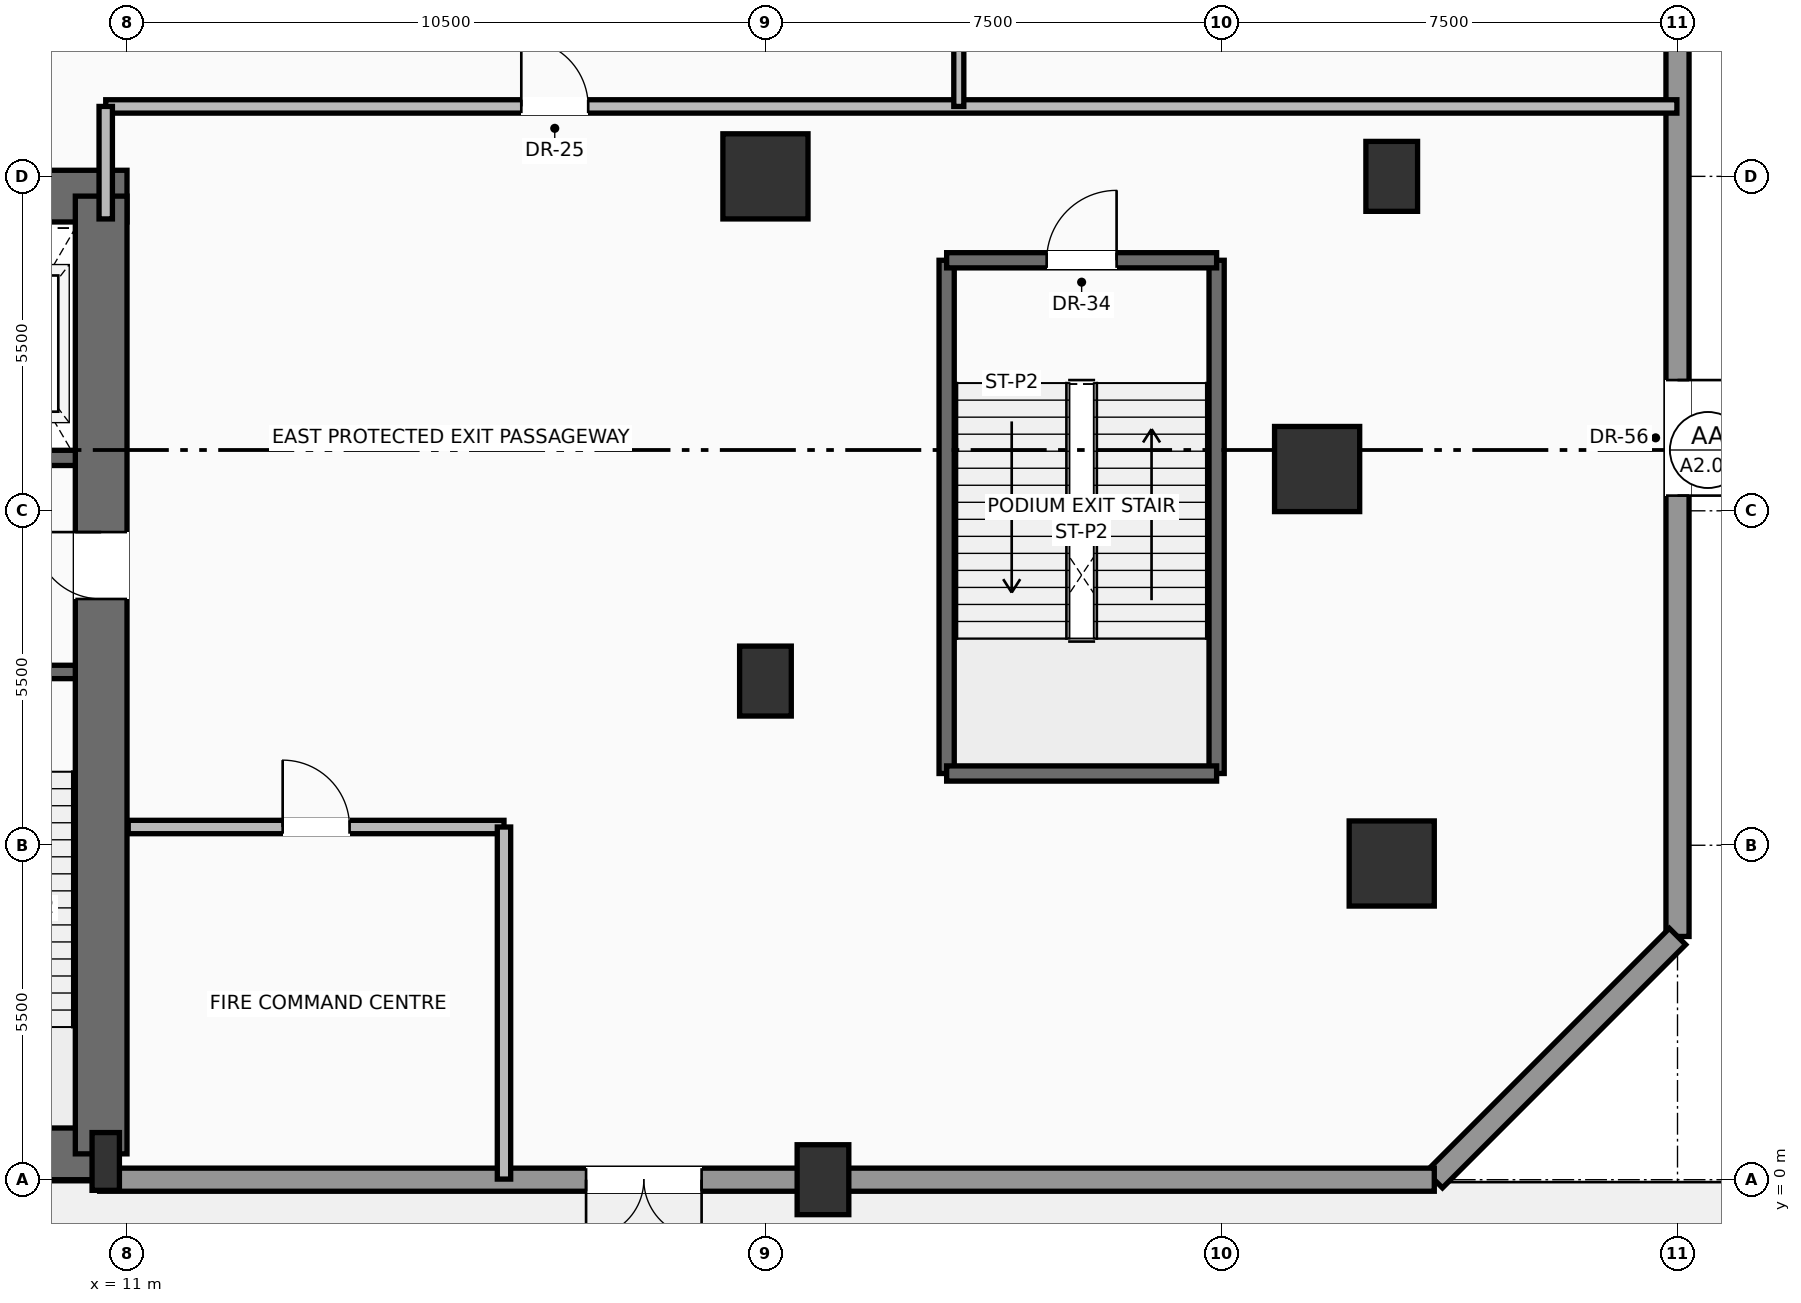
"""IFC4 building model, lengths in metres.
Left out: names, types, materials, properties, quantities, classifications, styles, units other than length and angle.
Written with IfcOpenShell. Run it as: python <this file> out.ifc"""

import sys

from ifc_helpers import new_model, si_unit, direction, frame, frame_2d, origin, origin_2d, place, context, subcontext, project, spatial, rectangle, hollow_rectangle, extrude, source, transform, mapped, element, fill, save


model = new_model("IFC4")
c1 = context("Model", 3, precision=1e-05, world=origin(), true_north=direction((0.0, 1.0)))
c2 = subcontext(c1, "Body", "Model", "MODEL_VIEW")
j1 = project(units=[si_unit("LENGTHUNIT", "METRE"), si_unit("PLANEANGLEUNIT", "RADIAN")], contexts=[c1])
p1 = place(None, origin())
s1 = spatial("IfcSite", under=j1, at=p1, CompositionType="ELEMENT")
p2 = place(p1, origin())
s2 = spatial("IfcBuilding", under=s1, at=p2, CompositionType="ELEMENT")
p3 = place(p2, origin())
s3 = spatial("IfcBuildingStorey", under=s2, at=p3, CompositionType="ELEMENT", Elevation=0.0)
p4 = place(p3, frame((-10.65, 0.425, 0.0), z_axis=(0.0, 0.0, 1.0), x_axis=(1.0, 0.0, 0.0)))
e1 = element("IfcWall", 1, at=p4, inside=s3, PredefinedType="SHEAR", context=c2, shape_type="SweptSolid", body=[
    extrude(rectangle(XDim=21.3, YDim=0.85, at=frame_2d((10.65, 0.0))), origin(), (0.0, 0.0, 1.0), 5.15),
])
p5 = place(p3, frame((-11.0, 16.175, 0.0), z_axis=(0.0, 0.0, 1.0), x_axis=(1.0, 0.0, 0.0)))
e2 = element("IfcWall", 2, at=p5, inside=s3, PredefinedType="SHEAR", context=c2, shape_type="SweptSolid", body=[
    extrude(rectangle(XDim=22.0, YDim=0.85, at=frame_2d((11.0, 0.0))), origin(), (0.0, 0.0, 1.0), 5.15),
])
p6 = place(p5, frame((3.57, 0.0, 0.0)))
e3 = element("IfcOpeningElement", 3, at=p6, cuts=e2, PredefinedType="OPENING", context=c2, shape_type="SweptSolid", body=[
    extrude(rectangle(XDim=1.3, YDim=2.3, at=frame_2d((0.65, 1.15))), frame((0.0, 0.435, 0.0), z_axis=(0.0, -1.0, 0.0), x_axis=(1.0, 0.0, 0.0)), (0.0, 0.0, 1.0), 0.87),
])
p7 = place(p5, frame((10.0, 0.0, 0.0)))
e4 = element("IfcOpeningElement", 4, at=p7, cuts=e2, PredefinedType="OPENING", context=c2, shape_type="SweptSolid", body=[
    extrude(rectangle(XDim=2.0, YDim=2.4, at=frame_2d((1.0, 1.2))), frame((0.0, 0.435, 0.0), z_axis=(0.0, -1.0, 0.0), x_axis=(1.0, 0.0, 0.0)), (0.0, 0.0, 1.0), 0.87),
])
p8 = place(p3, frame((10.575, 0.425, 0.0), z_axis=(0.0, 0.0, 1.0), x_axis=(0.0, 1.0, 0.0)))
e5 = element("IfcWall", 5, at=p8, inside=s3, PredefinedType="SHEAR", context=c2, shape_type="SweptSolid", body=[
    extrude(rectangle(XDim=15.75, YDim=0.85, at=frame_2d((7.875, 0.0))), origin(), (0.0, 0.0, 1.0), 5.15),
])
p9 = place(p8, frame((9.125, 0.0, 0.0)))
e6 = element("IfcOpeningElement", 6, at=p9, cuts=e5, PredefinedType="OPENING", context=c2, shape_type="SweptSolid", body=[
    extrude(rectangle(XDim=1.1, YDim=2.2, at=frame_2d((0.55, 1.1))), frame((0.0, 0.435, 0.0), z_axis=(0.0, -1.0, 0.0), x_axis=(1.0, 0.0, 0.0)), (0.0, 0.0, 1.0), 0.87),
])
m1 = source(origin(), c2, "Body", "SweptSolid", [
    extrude(rectangle(XDim=0.45, YDim=0.95, at=origin_2d()), origin(), (0.0, 0.0, 1.0), 5.5),
])
p10 = place(p3, frame((10.65, 0.3, 0.0), z_axis=(0.0, 0.0, 1.0), x_axis=(1.0, 0.0, 0.0)))
e7 = element("IfcColumn", 7, at=p10, inside=s3, PredefinedType="PILASTER", context=c2, shape_type="MappedRepresentation", body=[
    mapped(m1, transform((0.0, 0.0, 0.0), scale=1.0)),
])
m2 = source(origin(), c2, "Body", "SweptSolid", [
    extrude(rectangle(XDim=0.85, YDim=1.15, at=origin_2d()), origin(), (0.0, 0.0, 1.0), 5.5),
])
for number, where, z_axis, x_axis in (
    (8, (22.446, 0.0, 0.0), (0.0, 0.0, 1.0), (1.0, 0.0, 0.0)),
    (9, (21.5, 8.2, 0.0), (0.0, 0.0, 1.0), (1.0, 0.0, 0.0)),
    (10, (31.8, 16.5, 0.0), (0.0, 0.0, 1.0), (1.0, 0.0, 0.0)),
):
    element("IfcColumn", number, at=place(p3, frame(where, z_axis=z_axis, x_axis=x_axis)), inside=s3, PredefinedType="COLUMN", context=c2, shape_type="MappedRepresentation", body=[
        mapped(m2, transform((0.0, 0.0, 0.0), scale=1.0)),
    ])
m3 = source(origin(), c2, "Body", "SweptSolid", [
    extrude(hollow_rectangle(XDim=1.4, YDim=1.4, WallThickness=0.07, at=origin_2d()), origin(), (0.0, 0.0, 1.0), 5.5),
])
for number, where, z_axis, x_axis in (
    (11, (21.5, 16.5, 0.0), (0.0, 0.0, 1.0), (1.0, 0.0, 0.0)),
    (12, (31.8, 5.2, 0.0), (0.0, 0.0, 1.0), (1.0, 0.0, 0.0)),
    (13, (30.573, 11.687, 0.0), (0.0, 0.0, 1.0), (1.0, 0.0, 0.0)),
):
    element("IfcColumn", number, at=place(p3, frame(where, z_axis=z_axis, x_axis=x_axis)), inside=s3, PredefinedType="COLUMN", context=c2, shape_type="MappedRepresentation", body=[
        mapped(m3, transform((0.0, 0.0, 0.0), scale=1.0)),
    ])
p11 = place(p3, frame((36.5, 46.0, 0.0), z_axis=(0.0, 0.0, 1.0), x_axis=(0.0, -1.0, 0.0)))
e14 = element("IfcWall", 14, at=p11, inside=s3, PredefinedType="SOLIDWALL", context=c2, shape_type="SweptSolid", body=[
    extrude(rectangle(XDim=42.0, YDim=0.38, at=frame_2d((21.0, 0.0))), origin(), (0.0, 0.0, 1.0), 4.09),
])
p12 = place(p11, frame((32.85, 0.0, 0.0)))
e15 = element("IfcOpeningElement", 15, at=p12, cuts=e14, PredefinedType="OPENING", context=c2, shape_type="SweptSolid", body=[
    extrude(rectangle(XDim=1.9, YDim=2.3, at=frame_2d((0.95, 1.15))), frame((0.0, 0.2, 0.0), z_axis=(0.0, -1.0, 0.0), x_axis=(1.0, 0.0, 0.0)), (0.0, 0.0, 1.0), 0.4),
])
p13 = place(p11, frame((11.55, 0.0, 0.0)))
e16 = element("IfcOpeningElement", 16, at=p13, cuts=e14, PredefinedType="OPENING", context=c2, shape_type="SweptSolid", body=[
    extrude(rectangle(XDim=1.9, YDim=2.3, at=frame_2d((0.95, 1.15))), frame((0.0, 0.2, 0.0), z_axis=(0.0, -1.0, 0.0), x_axis=(1.0, 0.0, 0.0)), (0.0, 0.0, 1.0), 0.4),
])
p14 = place(p3, frame((36.5, 4.0, 0.0), z_axis=(0.0, 0.0, 1.0), x_axis=(-0.707106781187, -0.707106781187, 0.0)))
e17 = element("IfcWall", 17, at=p14, inside=s3, PredefinedType="SOLIDWALL", context=c2, shape_type="SweptSolid", body=[
    extrude(rectangle(XDim=5.657, YDim=0.38, at=frame_2d((2.828, 0.0))), origin(), (0.0, 0.0, 1.0), 4.09),
])
p15 = place(p3, frame((32.5, 0.0, 0.0), z_axis=(0.0, 0.0, 1.0), x_axis=(-1.0, 0.0, 0.0)))
e18 = element("IfcWall", 18, at=p15, inside=s3, PredefinedType="SOLIDWALL", context=c2, shape_type="SweptSolid", body=[
    extrude(rectangle(XDim=21.95, YDim=0.38, at=frame_2d((10.975, 0.0))), origin(), (0.0, 0.0, 1.0), 4.09),
])
p16 = place(p15, frame((12.05, 0.0, 0.0)))
e19 = element("IfcOpeningElement", 19, at=p16, cuts=e18, PredefinedType="OPENING", context=c2, shape_type="SweptSolid", body=[
    extrude(rectangle(XDim=1.9, YDim=2.3, at=frame_2d((0.95, 1.15))), frame((0.0, 0.2, 0.0), z_axis=(0.0, -1.0, 0.0), x_axis=(1.0, 0.0, 0.0)), (0.0, 0.0, 1.0), 0.4),
])
p17 = place(p3, frame((5.5, 8.35, 0.0), z_axis=(0.0, 0.0, 1.0), x_axis=(1.0, 0.0, 0.0)))
e20 = element("IfcWall", 20, at=p17, inside=s3, PredefinedType="SOLIDWALL", context=c2, shape_type="SweptSolid", body=[
    extrude(rectangle(XDim=4.65, YDim=0.22, at=frame_2d((2.325, 0.0))), origin(), (0.0, 0.0, 1.0), 5.15),
])
p18 = place(p17, frame((2.5, 0.0, 0.0)))
e21 = element("IfcOpeningElement", 21, at=p18, cuts=e20, PredefinedType="OPENING", context=c2, shape_type="SweptSolid", body=[
    extrude(rectangle(XDim=1.15, YDim=2.2, at=frame_2d((0.575, 1.1))), frame((0.0, 0.12, 0.0), z_axis=(0.0, -1.0, 0.0), x_axis=(1.0, 0.0, 0.0)), (0.0, 0.0, 1.0), 0.24),
])
p19 = place(p3, frame((10.15, 11.87, 0.0), z_axis=(0.0, 0.0, 1.0), x_axis=(-1.0, 0.0, 0.0)))
e22 = element("IfcWall", 22, at=p19, inside=s3, PredefinedType="SOLIDWALL", context=c2, shape_type="SweptSolid", body=[
    extrude(rectangle(XDim=4.65, YDim=0.25, at=frame_2d((2.325, 0.0))), origin(), (0.0, 0.0, 1.0), 5.15),
])
p20 = place(p19, frame((0.5, 0.0, 0.0)))
e23 = element("IfcOpeningElement", 23, at=p20, cuts=e22, PredefinedType="OPENING", context=c2, shape_type="SweptSolid", body=[
    extrude(rectangle(XDim=1.2, YDim=2.25, at=frame_2d((0.6, 1.125))), frame((0.0, 0.135, 0.0), z_axis=(0.0, -1.0, 0.0), x_axis=(1.0, 0.0, 0.0)), (0.0, 0.0, 1.0), 0.27),
])
for number, where, z_axis, x_axis in (
    (24, (24.48, 6.68, 0.0), (0.0, 0.0, 1.0), (0.0, 1.0, 0.0)),
    (25, (28.92, 6.68, 0.0), (0.0, 0.0, 1.0), (0.0, 1.0, 0.0)),
):
    element("IfcWall", number, at=place(p3, frame(where, z_axis=z_axis, x_axis=x_axis)), inside=s3, PredefinedType="SOLIDWALL", context=c2, shape_type="SweptSolid", body=[
        extrude(rectangle(XDim=8.44, YDim=0.25, at=frame_2d((4.22, 0.0))), origin(), (0.0, 0.0, 1.0), 5.15),
    ])
p21 = place(p3, frame((28.92, 6.68, 0.0), z_axis=(0.0, 0.0, 1.0), x_axis=(-1.0, 0.0, 0.0)))
e26 = element("IfcWall", 26, at=p21, inside=s3, PredefinedType="SOLIDWALL", context=c2, shape_type="SweptSolid", body=[
    extrude(rectangle(XDim=4.44, YDim=0.25, at=frame_2d((2.22, 0.0))), origin(), (0.0, 0.0, 1.0), 5.15),
])
p22 = place(p3, frame((24.48, 15.12, 0.0), z_axis=(0.0, 0.0, 1.0), x_axis=(1.0, 0.0, 0.0)))
e27 = element("IfcWall", 27, at=p22, inside=s3, PredefinedType="SOLIDWALL", context=c2, shape_type="SweptSolid", body=[
    extrude(rectangle(XDim=4.44, YDim=0.25, at=frame_2d((2.22, 0.0))), origin(), (0.0, 0.0, 1.0), 5.15),
])
p23 = place(p22, frame((1.645, 0.0, 0.0)))
e28 = element("IfcOpeningElement", 28, at=p23, cuts=e27, PredefinedType="OPENING", context=c2, shape_type="SweptSolid", body=[
    extrude(rectangle(XDim=1.15, YDim=2.2, at=frame_2d((0.575, 1.1))), frame((0.0, 0.135, 0.0), z_axis=(0.0, -1.0, 0.0), x_axis=(1.0, 0.0, 0.0)), (0.0, 0.0, 1.0), 0.27),
])
p24 = place(p3, frame((11.02, 5.8, 0.0), z_axis=(0.0, 0.0, 1.0), x_axis=(1.0, 0.0, 0.0)))
e29 = element("IfcWall", 29, at=p24, inside=s3, PredefinedType="SOLIDWALL", context=c2, shape_type="SweptSolid", body=[
    extrude(rectangle(XDim=6.18, YDim=0.22, at=frame_2d((3.09, 0.0))), origin(), (0.0, 0.0, 1.0), 5.142),
])
p25 = place(p24, frame((2.54, 0.0, 0.0)))
e30 = element("IfcOpeningElement", 30, at=p25, cuts=e29, PredefinedType="OPENING", context=c2, shape_type="SweptSolid", body=[
    extrude(rectangle(XDim=1.1, YDim=2.2, at=frame_2d((0.55, 1.1))), frame((0.0, 0.12, 0.0), z_axis=(0.0, -1.0, 0.0), x_axis=(1.0, 0.0, 0.0)), (0.0, 0.0, 1.0), 0.24),
])
p26 = place(p3, frame((17.2, 0.01, 0.0), z_axis=(0.0, 0.0, 1.0), x_axis=(0.0, 1.0, 0.0)))
e31 = element("IfcWall", 31, at=p26, inside=s3, PredefinedType="SOLIDWALL", context=c2, shape_type="SweptSolid", body=[
    extrude(rectangle(XDim=5.79, YDim=0.22, at=frame_2d((2.895, 0.0))), origin(), (0.0, 0.0, 1.0), 4.102),
])
p27 = place(p3, frame((10.65, 17.65, 0.0), z_axis=(0.0, 0.0, 1.0), x_axis=(1.0, 0.0, 0.0)))
e32 = element("IfcWall", 32, at=p27, inside=s3, PredefinedType="SOLIDWALL", context=c2, shape_type="SweptSolid", body=[
    extrude(rectangle(XDim=25.84, YDim=0.22, at=frame_2d((12.92, 0.0))), origin(), (0.0, 0.0, 1.0), 4.102),
])
p28 = place(p27, frame((6.835, 0.0, 0.0)))
e33 = element("IfcOpeningElement", 33, at=p28, cuts=e32, PredefinedType="OPENING", context=c2, shape_type="SweptSolid", body=[
    extrude(rectangle(XDim=1.1, YDim=2.2, at=frame_2d((0.55, 1.1))), frame((0.0, 0.12, 0.0), z_axis=(0.0, -1.0, 0.0), x_axis=(1.0, 0.0, 0.0)), (0.0, 0.0, 1.0), 0.24),
])
p29 = place(p3, frame((10.65, 15.8, 0.0), z_axis=(0.0, 0.0, 1.0), x_axis=(0.0, 1.0, 0.0)))
e34 = element("IfcWall", 34, at=p29, inside=s3, PredefinedType="SOLIDWALL", context=c2, shape_type="SweptSolid", body=[
    extrude(rectangle(XDim=1.85, YDim=0.22, at=frame_2d((0.925, 0.0))), origin(), (0.0, 0.0, 1.0), 4.102),
])
p30 = place(p3, frame((24.68, 17.65, 0.0), z_axis=(0.0, 0.0, 1.0), x_axis=(0.0, 1.0, 0.0)))
e35 = element("IfcWall", 35, at=p30, inside=s3, PredefinedType="PARTITIONING", context=c2, shape_type="SweptSolid", body=[
    extrude(rectangle(XDim=11.63, YDim=0.165, at=frame_2d((5.815, 0.0))), origin(), (0.0, 0.0, 1.0), 4.215),
])
p31 = place(p30, frame((4.815, 0.0, 0.0)))
e36 = element("IfcOpeningElement", 36, at=p31, cuts=e35, PredefinedType="OPENING", context=c2, shape_type="SweptSolid", body=[
    extrude(rectangle(XDim=2.0, YDim=2.4, at=frame_2d((1.0, 1.2))), frame((0.0, 0.093, 0.0), z_axis=(0.0, -1.0, 0.0), x_axis=(1.0, 0.0, 0.0)), (0.0, 0.0, 1.0), 0.185),
])
m4 = source(origin(), c2, "Body", "SweptSolid", [
    extrude(rectangle(XDim=1.9, YDim=2.3, at=frame_2d((0.95, 1.15))), frame((0.0, 0.025, 0.0), z_axis=(0.0, -1.0, 0.0), x_axis=(1.0, 0.0, 0.0)), (0.0, 0.0, 1.0), 0.05),
])
p32 = place(p12, origin())
e37 = element("IfcDoor", 37, at=p32, inside=s3, OperationType="DOUBLE_DOOR_SINGLE_SWING", PredefinedType="DOOR", context=c2, shape_type="MappedRepresentation", body=[
    mapped(m4, transform((0.0, 0.0, 0.0), scale=1.0)),
])
fill(e15, e37)
p33 = place(p16, origin())
e38 = element("IfcDoor", 38, at=p33, inside=s3, OperationType="DOUBLE_DOOR_SINGLE_SWING", PredefinedType="DOOR", context=c2, shape_type="MappedRepresentation", body=[
    mapped(m4, transform((0.0, 0.0, 0.0), scale=1.0)),
])
fill(e19, e38)
m5 = source(origin(), c2, "Body", "SweptSolid", [
    extrude(rectangle(XDim=1.1, YDim=2.2, at=frame_2d((0.55, 1.1))), frame((0.0, 0.025, 0.0), z_axis=(0.0, -1.0, 0.0), x_axis=(1.0, 0.0, 0.0)), (0.0, 0.0, 1.0), 0.05),
])
p34 = place(p9, origin())
e39 = element("IfcDoor", 39, at=p34, inside=s3, OperationType="SINGLE_SWING_RIGHT", PredefinedType="DOOR", context=c2, shape_type="MappedRepresentation", body=[
    mapped(m5, transform((0.0, 0.0, 0.0), scale=1.0)),
])
fill(e6, e39)
m6 = source(origin(), c2, "Body", "SweptSolid", [
    extrude(rectangle(XDim=1.15, YDim=2.2, at=frame_2d((0.575, 1.1))), frame((0.0, 0.025, 0.0), z_axis=(0.0, -1.0, 0.0), x_axis=(1.0, 0.0, 0.0)), (0.0, 0.0, 1.0), 0.05),
])
p35 = place(p23, origin())
e40 = element("IfcDoor", 40, at=p35, inside=s3, OperationType="SINGLE_SWING_RIGHT", PredefinedType="DOOR", context=c2, shape_type="MappedRepresentation", body=[
    mapped(m6, transform((0.0, 0.0, 0.0), scale=1.0)),
])
fill(e28, e40)
p36 = place(p25, origin())
e41 = element("IfcDoor", 41, at=p36, inside=s3, OperationType="SINGLE_SWING_LEFT", PredefinedType="DOOR", context=c2, shape_type="MappedRepresentation", body=[
    mapped(m5, transform((0.0, 0.0, 0.0), scale=1.0)),
])
fill(e30, e41)
p37 = place(p28, origin())
e42 = element("IfcDoor", 42, at=p37, inside=s3, OperationType="SINGLE_SWING_LEFT", PredefinedType="DOOR", context=c2, shape_type="MappedRepresentation", body=[
    mapped(m5, transform((0.0, 0.0, 0.0), scale=1.0)),
])
fill(e33, e42)
save(model, sys.argv[1])
